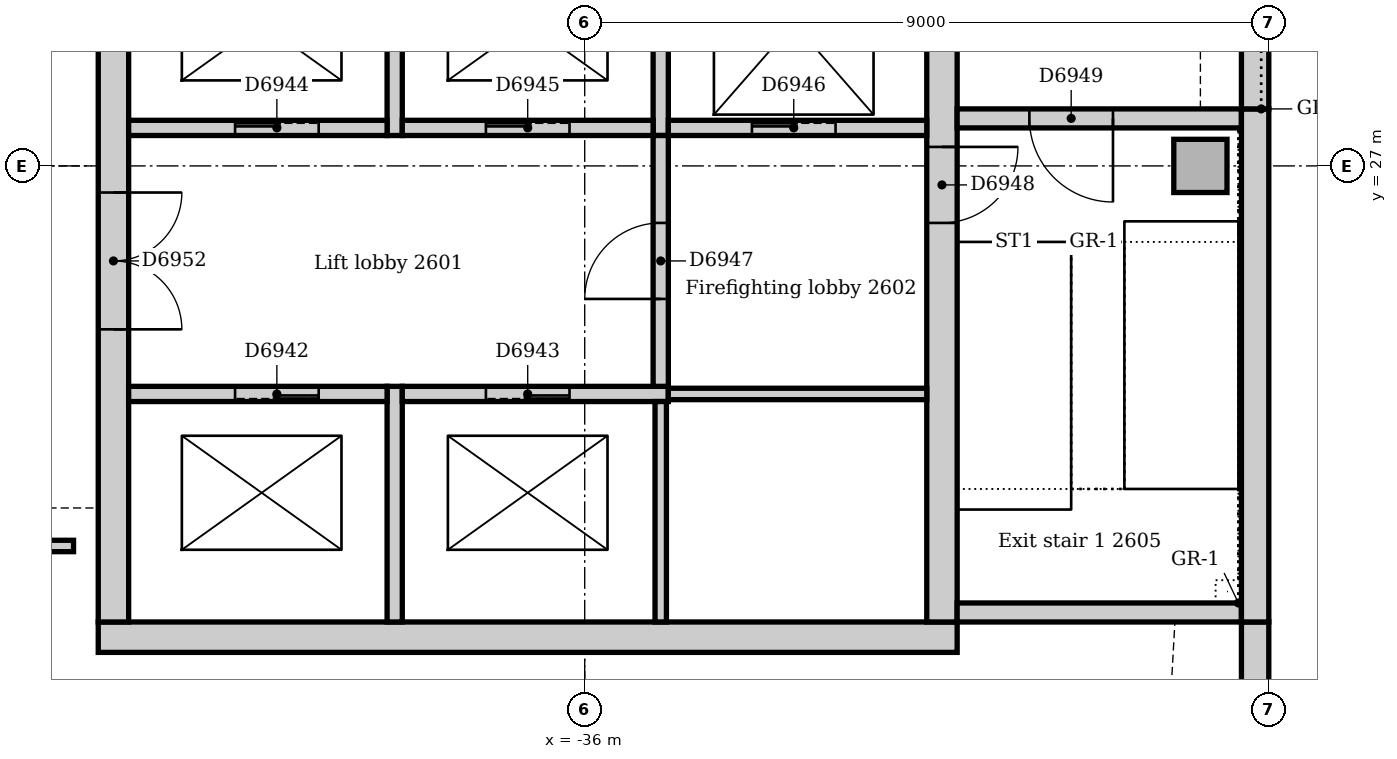
"""IFC4 building model, lengths in metres.
Left out: names, types, materials, properties, quantities, classifications, styles, units other than length and angle.
Written with IfcOpenShell. Run it as: python <this file> out.ifc"""

import sys

from ifc_helpers import new_model, si_unit, direction, frame, frame_2d, origin, origin_2d, place, context, subcontext, project, spatial, rectangle, extrude, element, fill, save


model = new_model("IFC4")
c1 = context("Model", 3, precision=1e-05, world=origin(), true_north=direction((0.0, 1.0)))
c2 = subcontext(c1, "Body", "Model", "MODEL_VIEW")
j1 = project(units=[si_unit("LENGTHUNIT", "METRE"), si_unit("PLANEANGLEUNIT", "RADIAN")], contexts=[c1])
p1 = place(None, origin())
s1 = spatial("IfcSite", under=j1, at=p1, CompositionType="ELEMENT")
p2 = place(p1, origin())
s2 = spatial("IfcBuilding", under=s1, at=p2, CompositionType="ELEMENT")
p3 = place(p2, frame((0.0, 0.0, 112.0)))
s3 = spatial("IfcBuildingStorey", under=s2, at=p3, CompositionType="ELEMENT", Elevation=112.0)
p4 = place(p3, frame((-42.4, 20.8, 0.0), z_axis=(0.0, 0.0, 1.0), x_axis=(1.0, 0.0, 0.0)))
e1 = element("IfcWall", 1, at=p4, inside=s3, PredefinedType="SOLIDWALL", context=c2, shape_type="SweptSolid", body=[
    extrude(rectangle(XDim=11.3, YDim=0.4, at=frame_2d((5.65, 0.0))), origin(), (0.0, 0.0, 1.0), 4.0),
])
p5 = place(p3, frame((-31.3, 21.0, 0.0), z_axis=(0.0, 0.0, 1.0), x_axis=(0.0, 1.0, 0.0)))
e2 = element("IfcWall", 2, at=p5, inside=s3, PredefinedType="SOLIDWALL", context=c2, shape_type="SweptSolid", body=[
    extrude(rectangle(XDim=9.5, YDim=0.4, at=frame_2d((4.75, 0.0))), origin(), (0.0, 0.0, 1.0), 4.0),
])
p6 = place(p5, frame((5.25, 0.0, 0.0)))
e3 = element("IfcOpeningElement", 3, at=p6, cuts=e2, PredefinedType="OPENING", context=c2, shape_type="SweptSolid", body=[
    extrude(rectangle(XDim=1.0, YDim=2.1, at=frame_2d((0.5, 1.05))), frame((0.0, 0.21, 0.0), z_axis=(0.0, -1.0, 0.0), x_axis=(1.0, 0.0, 0.0)), (0.0, 0.0, 1.0), 0.42),
])
p7 = place(p3, frame((-42.2, 30.5, 0.0), z_axis=(0.0, 0.0, 1.0), x_axis=(0.0, -1.0, 0.0)))
e4 = element("IfcWall", 4, at=p7, inside=s3, PredefinedType="SOLIDWALL", context=c2, shape_type="SweptSolid", body=[
    extrude(rectangle(XDim=9.5, YDim=0.4, at=frame_2d((4.75, 0.0))), origin(), (0.0, 0.0, 1.0), 4.0),
])
p8 = place(p7, frame((3.85, 0.0, 0.0)))
e5 = element("IfcOpeningElement", 5, at=p8, cuts=e4, PredefinedType="OPENING", context=c2, shape_type="SweptSolid", body=[
    extrude(rectangle(XDim=1.8, YDim=2.1, at=frame_2d((0.9, 1.05))), frame((0.0, 0.21, 0.0), z_axis=(0.0, -1.0, 0.0), x_axis=(1.0, 0.0, 0.0)), (0.0, 0.0, 1.0), 0.42),
])
p9 = place(p3, frame((-31.1, 21.125, 0.0), z_axis=(0.0, 0.0, 1.0), x_axis=(1.0, 0.0, 0.0)))
e6 = element("IfcWall", 6, at=p9, inside=s3, PredefinedType="SOLIDWALL", context=c2, shape_type="SweptSolid", body=[
    extrude(rectangle(XDim=3.74, YDim=0.25, at=frame_2d((1.87, 0.0))), origin(), (0.0, 0.0, 1.0), 4.0),
])
p10 = place(p3, frame((-27.36, 27.625, 0.0), z_axis=(0.0, 0.0, 1.0), x_axis=(-1.0, 0.0, 0.0)))
e7 = element("IfcWall", 7, at=p10, inside=s3, PredefinedType="SOLIDWALL", context=c2, shape_type="SweptSolid", body=[
    extrude(rectangle(XDim=3.74, YDim=0.25, at=frame_2d((1.87, 0.0))), origin(), (0.0, 0.0, 1.0), 4.0),
])
p11 = place(p10, frame((1.69, 0.0, 0.0)))
e8 = element("IfcOpeningElement", 8, at=p11, cuts=e7, PredefinedType="OPENING", context=c2, shape_type="SweptSolid", body=[
    extrude(rectangle(XDim=1.1, YDim=2.1, at=frame_2d((0.55, 1.05))), frame((0.0, 0.135, 0.0), z_axis=(0.0, -1.0, 0.0), x_axis=(1.0, 0.0, 0.0)), (0.0, 0.0, 1.0), 0.27),
])
p12 = place(p3, frame((-27.9, 27.0, 0.0), z_axis=(0.0, 0.0, 1.0), x_axis=(1.0, 0.0, 0.0)))
e9 = element("IfcColumn", 9, at=p12, inside=s3, PredefinedType="COLUMN", context=c2, shape_type="SweptSolid", body=[
    extrude(rectangle(XDim=0.7, YDim=0.7, at=origin_2d()), origin(), (0.0, 0.0, 1.0), 4.0),
])
p13 = place(p3, frame((-27.18, 17.743, 0.0), z_axis=(0.0, 0.0, 1.0), x_axis=(0.0, 1.0, 0.0)))
e10 = element("IfcWall", 10, at=p13, inside=s3, PredefinedType="STANDARD", context=c2, shape_type="SweptSolid", body=[
    extrude(rectangle(XDim=3.257, YDim=0.36, at=frame_2d((1.629, 0.0))), origin(), (0.0, 0.0, 1.0), 3.85),
])
p14 = place(p3, frame((-27.18, 21.0, 0.0), z_axis=(0.0, 0.0, 1.0), x_axis=(0.0, 1.0, 0.0)))
e11 = element("IfcWall", 11, at=p14, inside=s3, PredefinedType="STANDARD", context=c2, shape_type="SweptSolid", body=[
    extrude(rectangle(XDim=6.75, YDim=0.36, at=frame_2d((3.375, 0.0))), origin(), (0.0, 0.0, 1.0), 3.85),
])
p15 = place(p3, frame((-27.18, 27.75, 0.0), z_axis=(0.0, 0.0, 1.0), x_axis=(0.0, 1.0, 0.0)))
e12 = element("IfcWall", 12, at=p15, inside=s3, PredefinedType="STANDARD", context=c2, shape_type="SweptSolid", body=[
    extrude(rectangle(XDim=7.5, YDim=0.36, at=frame_2d((3.75, 0.0))), origin(), (0.0, 0.0, 1.0), 3.85),
])
p16 = place(p15, frame((2.85, 0.0, 1.2)))
e13 = element("IfcOpeningElement", 13, at=p16, cuts=e12, PredefinedType="OPENING", context=c2, shape_type="SweptSolid", body=[
    extrude(rectangle(XDim=1.8, YDim=1.2, at=frame_2d((0.9, 0.6))), frame((0.0, 0.19, 0.0), z_axis=(0.0, -1.0, 0.0), x_axis=(1.0, 0.0, 0.0)), (0.0, 0.0, 1.0), 0.38),
])
p17 = place(p3, frame((-38.5, 21.0, 0.0), z_axis=(0.0, 0.0, 1.0), x_axis=(0.0, 1.0, 0.0)))
e14 = element("IfcWall", 14, at=p17, inside=s3, PredefinedType="SOLIDWALL", context=c2, shape_type="SweptSolid", body=[
    extrude(rectangle(XDim=3.1, YDim=0.2, at=frame_2d((1.55, 0.0))), origin(), (0.0, 0.0, 1.0), 4.0),
])
p18 = place(p3, frame((-38.6, 24.0, 0.0), z_axis=(0.0, 0.0, 1.0), x_axis=(-1.0, 0.0, 0.0)))
e15 = element("IfcWall", 15, at=p18, inside=s3, PredefinedType="SOLIDWALL", context=c2, shape_type="SweptSolid", body=[
    extrude(rectangle(XDim=3.4, YDim=0.2, at=frame_2d((1.7, 0.0))), origin(), (0.0, 0.0, 1.0), 4.0),
])
p19 = place(p18, frame((0.9, 0.0, 0.0)))
e16 = element("IfcOpeningElement", 16, at=p19, cuts=e15, PredefinedType="OPENING", context=c2, shape_type="SweptSolid", body=[
    extrude(rectangle(XDim=1.1, YDim=2.1, at=frame_2d((0.55, 1.05))), frame((0.0, 0.11, 0.0), z_axis=(0.0, -1.0, 0.0), x_axis=(1.0, 0.0, 0.0)), (0.0, 0.0, 1.0), 0.22),
])
p20 = place(p3, frame((-34.9, 24.0, 0.0), z_axis=(0.0, 0.0, 1.0), x_axis=(-1.0, 0.0, 0.0)))
e17 = element("IfcWall", 17, at=p20, inside=s3, PredefinedType="SOLIDWALL", context=c2, shape_type="SweptSolid", body=[
    extrude(rectangle(XDim=3.5, YDim=0.2, at=frame_2d((1.75, 0.0))), origin(), (0.0, 0.0, 1.0), 4.0),
])
p21 = place(p20, frame((1.3, 0.0, 0.0)))
e18 = element("IfcOpeningElement", 18, at=p21, cuts=e17, PredefinedType="OPENING", context=c2, shape_type="SweptSolid", body=[
    extrude(rectangle(XDim=1.1, YDim=2.1, at=frame_2d((0.55, 1.05))), frame((0.0, 0.11, 0.0), z_axis=(0.0, -1.0, 0.0), x_axis=(1.0, 0.0, 0.0)), (0.0, 0.0, 1.0), 0.22),
])
p22 = place(p3, frame((-38.5, 27.4, 0.0), z_axis=(0.0, 0.0, 1.0), x_axis=(0.0, 1.0, 0.0)))
e19 = element("IfcWall", 19, at=p22, inside=s3, PredefinedType="SOLIDWALL", context=c2, shape_type="SweptSolid", body=[
    extrude(rectangle(XDim=2.85, YDim=0.2, at=frame_2d((1.425, 0.0))), origin(), (0.0, 0.0, 1.0), 4.0),
])
p23 = place(p3, frame((-42.0, 27.5, 0.0), z_axis=(0.0, 0.0, 1.0), x_axis=(1.0, 0.0, 0.0)))
e20 = element("IfcWall", 20, at=p23, inside=s3, PredefinedType="SOLIDWALL", context=c2, shape_type="SweptSolid", body=[
    extrude(rectangle(XDim=3.4, YDim=0.2, at=frame_2d((1.7, 0.0))), origin(), (0.0, 0.0, 1.0), 4.0),
])
p24 = place(p23, frame((1.4, 0.0, 0.0)))
e21 = element("IfcOpeningElement", 21, at=p24, cuts=e20, PredefinedType="OPENING", context=c2, shape_type="SweptSolid", body=[
    extrude(rectangle(XDim=1.1, YDim=2.1, at=frame_2d((0.55, 1.05))), frame((0.0, 0.11, 0.0), z_axis=(0.0, -1.0, 0.0), x_axis=(1.0, 0.0, 0.0)), (0.0, 0.0, 1.0), 0.22),
])
p25 = place(p3, frame((-35.0, 27.4, 0.0), z_axis=(0.0, 0.0, 1.0), x_axis=(0.0, 1.0, 0.0)))
e22 = element("IfcWall", 22, at=p25, inside=s3, PredefinedType="SOLIDWALL", context=c2, shape_type="SweptSolid", body=[
    extrude(rectangle(XDim=2.85, YDim=0.2, at=frame_2d((1.425, 0.0))), origin(), (0.0, 0.0, 1.0), 4.0),
])
p26 = place(p3, frame((-38.4, 27.5, 0.0), z_axis=(0.0, 0.0, 1.0), x_axis=(1.0, 0.0, 0.0)))
e23 = element("IfcWall", 23, at=p26, inside=s3, PredefinedType="SOLIDWALL", context=c2, shape_type="SweptSolid", body=[
    extrude(rectangle(XDim=3.3, YDim=0.2, at=frame_2d((1.65, 0.0))), origin(), (0.0, 0.0, 1.0), 4.0),
])
p27 = place(p26, frame((1.1, 0.0, 0.0)))
e24 = element("IfcOpeningElement", 24, at=p27, cuts=e23, PredefinedType="OPENING", context=c2, shape_type="SweptSolid", body=[
    extrude(rectangle(XDim=1.1, YDim=2.1, at=frame_2d((0.55, 1.05))), frame((0.0, 0.11, 0.0), z_axis=(0.0, -1.0, 0.0), x_axis=(1.0, 0.0, 0.0)), (0.0, 0.0, 1.0), 0.22),
])
p28 = place(p3, frame((-34.9, 27.5, 0.0), z_axis=(0.0, 0.0, 1.0), x_axis=(1.0, 0.0, 0.0)))
e25 = element("IfcWall", 25, at=p28, inside=s3, PredefinedType="SOLIDWALL", context=c2, shape_type="SweptSolid", body=[
    extrude(rectangle(XDim=3.4, YDim=0.2, at=frame_2d((1.7, 0.0))), origin(), (0.0, 0.0, 1.0), 4.0),
])
p29 = place(p28, frame((1.1, 0.0, 0.0)))
e26 = element("IfcOpeningElement", 26, at=p29, cuts=e25, PredefinedType="OPENING", context=c2, shape_type="SweptSolid", body=[
    extrude(rectangle(XDim=1.1, YDim=2.1, at=frame_2d((0.55, 1.05))), frame((0.0, 0.11, 0.0), z_axis=(0.0, -1.0, 0.0), x_axis=(1.0, 0.0, 0.0)), (0.0, 0.0, 1.0), 0.22),
])
p30 = place(p3, frame((-35.0, 24.1, 0.0), z_axis=(0.0, 0.0, 1.0), x_axis=(0.0, 1.0, 0.0)))
e27 = element("IfcWall", 27, at=p30, inside=s3, PredefinedType="SOLIDWALL", context=c2, shape_type="SweptSolid", body=[
    extrude(rectangle(XDim=3.3, YDim=0.2, at=frame_2d((1.65, 0.0))), origin(), (0.0, 0.0, 1.0), 4.0),
])
p31 = place(p30, frame((1.15, 0.0, 0.0)))
e28 = element("IfcOpeningElement", 28, at=p31, cuts=e27, PredefinedType="OPENING", context=c2, shape_type="SweptSolid", body=[
    extrude(rectangle(XDim=1.0, YDim=2.1, at=frame_2d((0.5, 1.05))), frame((0.0, 0.11, 0.0), z_axis=(0.0, -1.0, 0.0), x_axis=(1.0, 0.0, 0.0)), (0.0, 0.0, 1.0), 0.22),
])
p32 = place(p3, frame((-35.0, 21.0, 0.0), z_axis=(0.0, 0.0, 1.0), x_axis=(0.0, 1.0, 0.0)))
e29 = element("IfcWall", 29, at=p32, inside=s3, PredefinedType="SOLIDWALL", context=c2, shape_type="SweptSolid", body=[
    extrude(rectangle(XDim=2.9, YDim=0.15, at=frame_2d((1.45, 0.0))), origin(), (0.0, 0.0, 1.0), 4.0),
])
p33 = place(p3, frame((-31.5, 24.0, 0.0), z_axis=(0.0, 0.0, 1.0), x_axis=(-1.0, 0.0, 0.0)))
e30 = element("IfcWall", 30, at=p33, inside=s3, PredefinedType="SOLIDWALL", context=c2, shape_type="SweptSolid", body=[
    extrude(rectangle(XDim=3.4, YDim=0.15, at=frame_2d((1.7, 0.0))), origin(), (0.0, 0.0, 1.0), 4.0),
])
p34 = place(p3, frame((-59.766, 22.0, 0.0), z_axis=(0.0, 0.0, 1.0), x_axis=(1.0, 0.0, 0.0)))
e31 = element("IfcWall", 31, at=p34, inside=s3, PredefinedType="PARTITIONING", context=c2, shape_type="SweptSolid", body=[
    extrude(rectangle(XDim=17.041, YDim=0.15, at=frame_2d((8.52, 0.0))), origin(), (0.0, 0.0, 1.0), 3.85),
])
p35 = place(p34, frame((15.366, 0.0, 0.0)))
e32 = element("IfcOpeningElement", 32, at=p35, cuts=e31, PredefinedType="OPENING", context=c2, shape_type="SweptSolid", body=[
    extrude(rectangle(XDim=0.9, YDim=2.1, at=frame_2d((0.45, 1.05))), frame((0.0, 0.085, 0.0), z_axis=(0.0, -1.0, 0.0), x_axis=(1.0, 0.0, 0.0)), (0.0, 0.0, 1.0), 0.17),
])
p36 = place(p34, frame((2.5, 0.0, 0.0)))
e33 = element("IfcOpeningElement", 33, at=p36, cuts=e31, PredefinedType="OPENING", context=c2, shape_type="SweptSolid", body=[
    extrude(rectangle(XDim=0.9, YDim=2.1, at=frame_2d((0.45, 1.05))), frame((0.0, 0.085, 0.0), z_axis=(0.0, -1.0, 0.0), x_axis=(1.0, 0.0, 0.0)), (0.0, 0.0, 1.0), 0.17),
])
p37 = place(p34, frame((9.056, 0.0, 0.0)))
e34 = element("IfcOpeningElement", 34, at=p37, cuts=e31, PredefinedType="OPENING", context=c2, shape_type="SweptSolid", body=[
    extrude(rectangle(XDim=1.0, YDim=2.1, at=frame_2d((0.5, 1.05))), frame((0.0, 0.085, 0.0), z_axis=(0.0, -1.0, 0.0), x_axis=(1.0, 0.0, 0.0)), (0.0, 0.0, 1.0), 0.17),
])
p38 = place(p19, origin())
e35 = element("IfcDoor", 35, at=p38, inside=s3, OperationType="SLIDING_TO_LEFT", PredefinedType="DOOR", context=c2, shape_type="SweptSolid", body=[
    extrude(rectangle(XDim=1.1, YDim=2.1, at=frame_2d((0.55, 1.05))), frame((0.0, 0.025, 0.0), z_axis=(0.0, -1.0, 0.0), x_axis=(1.0, 0.0, 0.0)), (0.0, 0.0, 1.0), 0.05),
])
fill(e16, e35)
p39 = place(p21, origin())
e36 = element("IfcDoor", 36, at=p39, inside=s3, OperationType="SLIDING_TO_LEFT", PredefinedType="DOOR", context=c2, shape_type="SweptSolid", body=[
    extrude(rectangle(XDim=1.1, YDim=2.1, at=frame_2d((0.55, 1.05))), frame((0.0, 0.025, 0.0), z_axis=(0.0, -1.0, 0.0), x_axis=(1.0, 0.0, 0.0)), (0.0, 0.0, 1.0), 0.05),
])
fill(e18, e36)
p40 = place(p24, origin())
e37 = element("IfcDoor", 37, at=p40, inside=s3, OperationType="SLIDING_TO_LEFT", PredefinedType="DOOR", context=c2, shape_type="SweptSolid", body=[
    extrude(rectangle(XDim=1.1, YDim=2.1, at=frame_2d((0.55, 1.05))), frame((0.0, 0.025, 0.0), z_axis=(0.0, -1.0, 0.0), x_axis=(1.0, 0.0, 0.0)), (0.0, 0.0, 1.0), 0.05),
])
fill(e21, e37)
p41 = place(p27, origin())
e38 = element("IfcDoor", 38, at=p41, inside=s3, OperationType="SLIDING_TO_LEFT", PredefinedType="DOOR", context=c2, shape_type="SweptSolid", body=[
    extrude(rectangle(XDim=1.1, YDim=2.1, at=frame_2d((0.55, 1.05))), frame((0.0, 0.025, 0.0), z_axis=(0.0, -1.0, 0.0), x_axis=(1.0, 0.0, 0.0)), (0.0, 0.0, 1.0), 0.05),
])
fill(e24, e38)
p42 = place(p29, origin())
e39 = element("IfcDoor", 39, at=p42, inside=s3, OperationType="SLIDING_TO_LEFT", PredefinedType="DOOR", context=c2, shape_type="SweptSolid", body=[
    extrude(rectangle(XDim=1.1, YDim=2.1, at=frame_2d((0.55, 1.05))), frame((0.0, 0.025, 0.0), z_axis=(0.0, -1.0, 0.0), x_axis=(1.0, 0.0, 0.0)), (0.0, 0.0, 1.0), 0.05),
])
fill(e26, e39)
p43 = place(p31, origin())
e40 = element("IfcDoor", 40, at=p43, inside=s3, OperationType="SINGLE_SWING_LEFT", PredefinedType="DOOR", context=c2, shape_type="SweptSolid", body=[
    extrude(rectangle(XDim=1.0, YDim=2.1, at=frame_2d((0.5, 1.05))), frame((0.0, 0.025, 0.0), z_axis=(0.0, -1.0, 0.0), x_axis=(1.0, 0.0, 0.0)), (0.0, 0.0, 1.0), 0.05),
])
fill(e28, e40)
p44 = place(p6, frame((1.0, 0.0, 0.0), z_axis=(0.0, 0.0, 1.0), x_axis=(-1.0, 0.0, 0.0)))
e41 = element("IfcDoor", 41, at=p44, inside=s3, OperationType="SINGLE_SWING_LEFT", PredefinedType="DOOR", context=c2, shape_type="SweptSolid", body=[
    extrude(rectangle(XDim=1.0, YDim=2.1, at=frame_2d((0.5, 1.05))), frame((0.0, 0.025, 0.0), z_axis=(0.0, -1.0, 0.0), x_axis=(1.0, 0.0, 0.0)), (0.0, 0.0, 1.0), 0.05),
])
fill(e3, e41)
p45 = place(p11, origin())
e42 = element("IfcDoor", 42, at=p45, inside=s3, OperationType="SINGLE_SWING_LEFT", PredefinedType="DOOR", context=c2, shape_type="SweptSolid", body=[
    extrude(rectangle(XDim=1.1, YDim=2.1, at=frame_2d((0.55, 1.05))), frame((0.0, 0.025, 0.0), z_axis=(0.0, -1.0, 0.0), x_axis=(1.0, 0.0, 0.0)), (0.0, 0.0, 1.0), 0.05),
])
fill(e8, e42)
p46 = place(p8, origin())
e43 = element("IfcDoor", 43, at=p46, inside=s3, OperationType="DOUBLE_DOOR_SINGLE_SWING", PredefinedType="DOOR", context=c2, shape_type="SweptSolid", body=[
    extrude(rectangle(XDim=1.8, YDim=2.1, at=frame_2d((0.9, 1.05))), frame((0.0, 0.025, 0.0), z_axis=(0.0, -1.0, 0.0), x_axis=(1.0, 0.0, 0.0)), (0.0, 0.0, 1.0), 0.05),
])
fill(e5, e43)
save(model, sys.argv[1])
